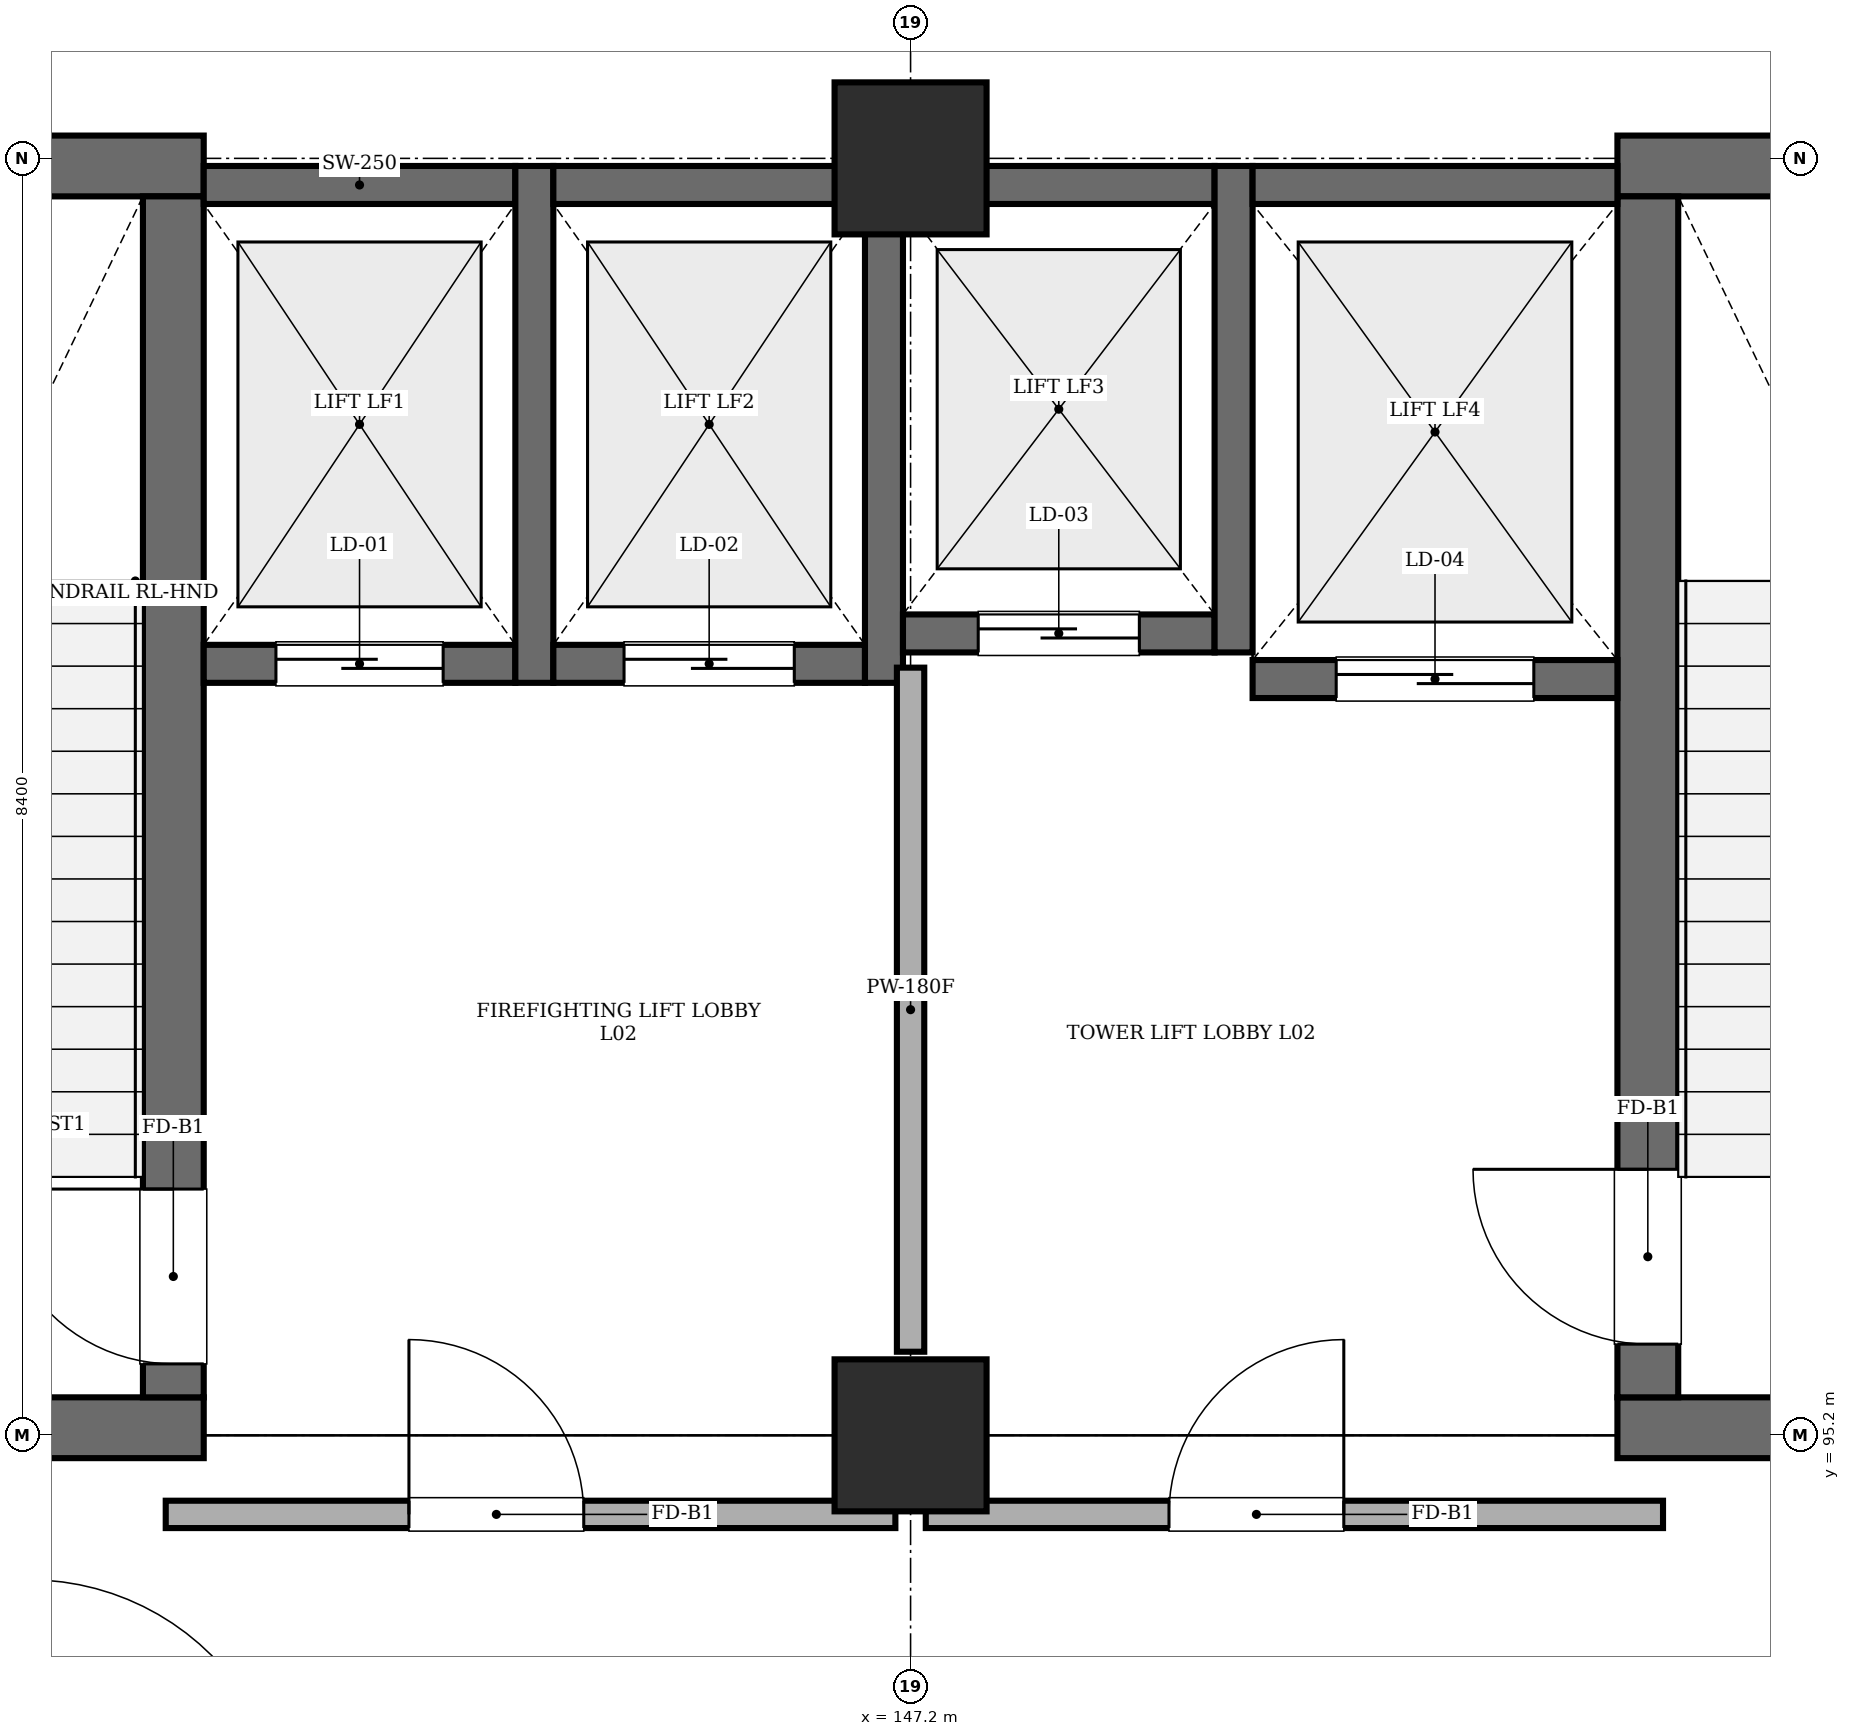
"""IFC4 building model, lengths in metres.
Left out: names, types, materials, properties, quantities, classifications, styles, units other than length and angle.
Written with IfcOpenShell. Run it as: python <this file> out.ifc"""

import sys

from ifc_helpers import new_model, si_unit, direction, frame, frame_2d, origin, origin_2d, place, context, subcontext, project, spatial, rectangle, extrude, element, fill, save


model = new_model("IFC4")
c1 = context("Model", 3, precision=1e-05, world=origin(), true_north=direction((0.0, 1.0)))
c2 = subcontext(c1, "Body", "Model", "MODEL_VIEW")
j1 = project(units=[si_unit("LENGTHUNIT", "METRE"), si_unit("PLANEANGLEUNIT", "RADIAN")], contexts=[c1])
p1 = place(None, origin())
s1 = spatial("IfcSite", under=j1, at=p1, CompositionType="ELEMENT")
p2 = place(p1, origin())
s2 = spatial("IfcBuilding", under=s1, at=p2, CompositionType="ELEMENT")
p3 = place(p2, frame((0.0, 0.0, 5.4)))
s3 = spatial("IfcBuildingStorey", under=s2, at=p3, CompositionType="ELEMENT", Elevation=5.4)
for number, where, z_axis, x_axis in (
    (1, (147.2, 95.2, 0.0), (0.0, 0.0, 1.0), (1.0, 0.0, 0.0)),
    (2, (147.2, 103.6, 0.0), (0.0, 0.0, 1.0), (1.0, 0.0, 0.0)),
):
    element("IfcColumn", number, at=place(p3, frame(where, z_axis=z_axis, x_axis=x_axis)), inside=s3, PredefinedType="COLUMN", context=c2, shape_type="SweptSolid", body=[
        extrude(rectangle(XDim=1.0, YDim=1.0, at=origin_2d()), origin(), (0.0, 0.0, 1.0), 4.58),
    ])
for number, where, z_axis, x_axis in (
    (3, (138.65, 95.25, 0.0), (0.0, 0.0, 1.0), (1.0, 0.0, 0.0)),
    (4, (138.65, 103.55, 0.0), (0.0, 0.0, 1.0), (1.0, 0.0, 0.0)),
):
    element("IfcWall", number, at=place(p3, frame(where, z_axis=z_axis, x_axis=x_axis)), inside=s3, PredefinedType="SHEAR", context=c2, shape_type="SweptSolid", body=[
        extrude(rectangle(XDim=3.9, YDim=0.4, at=frame_2d((1.95, 0.0))), origin(), (0.0, 0.0, 1.0), 4.58),
    ])
p4 = place(p3, frame((142.35, 95.45, 0.0), z_axis=(0.0, 0.0, 1.0), x_axis=(0.0, 1.0, 0.0)))
e5 = element("IfcWall", 5, at=p4, inside=s3, PredefinedType="SHEAR", context=c2, shape_type="SweptSolid", body=[
    extrude(rectangle(XDim=7.9, YDim=0.4, at=frame_2d((3.95, 0.0))), origin(), (0.0, 0.0, 1.0), 4.58),
])
p5 = place(p4, frame((0.22, 0.0, 0.0)))
e6 = element("IfcOpeningElement", 6, at=p5, cuts=e5, PredefinedType="OPENING", context=c2, shape_type="SweptSolid", body=[
    extrude(rectangle(XDim=1.15, YDim=2.15, at=frame_2d((0.575, 1.075))), frame((0.0, 0.21, 0.0), z_axis=(0.0, -1.0, 0.0), x_axis=(1.0, 0.0, 0.0)), (0.0, 0.0, 1.0), 0.42),
])
for number, where, z_axis, x_axis in (
    (7, (151.85, 95.25, 0.0), (0.0, 0.0, 1.0), (1.0, 0.0, 0.0)),
    (8, (151.85, 103.55, 0.0), (0.0, 0.0, 1.0), (1.0, 0.0, 0.0)),
):
    element("IfcWall", number, at=place(p3, frame(where, z_axis=z_axis, x_axis=x_axis)), inside=s3, PredefinedType="SHEAR", context=c2, shape_type="SweptSolid", body=[
        extrude(rectangle(XDim=3.9, YDim=0.4, at=frame_2d((1.95, 0.0))), origin(), (0.0, 0.0, 1.0), 4.58),
    ])
p6 = place(p3, frame((152.05, 95.45, 0.0), z_axis=(0.0, 0.0, 1.0), x_axis=(0.0, 1.0, 0.0)))
e9 = element("IfcWall", 9, at=p6, inside=s3, PredefinedType="SHEAR", context=c2, shape_type="SweptSolid", body=[
    extrude(rectangle(XDim=7.9, YDim=0.4, at=frame_2d((3.95, 0.0))), origin(), (0.0, 0.0, 1.0), 4.58),
])
p7 = place(p6, frame((0.35, 0.0, 0.0)))
e10 = element("IfcOpeningElement", 10, at=p7, cuts=e9, PredefinedType="OPENING", context=c2, shape_type="SweptSolid", body=[
    extrude(rectangle(XDim=1.15, YDim=2.15, at=frame_2d((0.575, 1.075))), frame((0.0, 0.21, 0.0), z_axis=(0.0, -1.0, 0.0), x_axis=(1.0, 0.0, 0.0)), (0.0, 0.0, 1.0), 0.42),
])
p8 = place(p3, frame((142.55, 100.275, 0.0), z_axis=(0.0, 0.0, 1.0), x_axis=(1.0, 0.0, 0.0)))
e11 = element("IfcWall", 11, at=p8, inside=s3, PredefinedType="SHEAR", context=c2, shape_type="SweptSolid", body=[
    extrude(rectangle(XDim=2.05, YDim=0.25, at=frame_2d((1.025, 0.0))), origin(), (0.0, 0.0, 1.0), 4.58),
])
p9 = place(p8, frame((0.475, 0.0, 0.0)))
e12 = element("IfcOpeningElement", 12, at=p9, cuts=e11, PredefinedType="OPENING", context=c2, shape_type="SweptSolid", body=[
    extrude(rectangle(XDim=1.1, YDim=2.15, at=frame_2d((0.55, 1.075))), frame((0.0, 0.135, 0.0), z_axis=(0.0, -1.0, 0.0), x_axis=(1.0, 0.0, 0.0)), (0.0, 0.0, 1.0), 0.27),
])
p10 = place(p3, frame((142.55, 103.425, 0.0), z_axis=(0.0, 0.0, 1.0), x_axis=(1.0, 0.0, 0.0)))
e13 = element("IfcWall", 13, at=p10, inside=s3, PredefinedType="SHEAR", context=c2, shape_type="SweptSolid", body=[
    extrude(rectangle(XDim=2.05, YDim=0.25, at=frame_2d((1.025, 0.0))), origin(), (0.0, 0.0, 1.0), 4.58),
])
p11 = place(p3, frame((144.725, 100.15, 0.0), z_axis=(0.0, 0.0, 1.0), x_axis=(0.0, 1.0, 0.0)))
e14 = element("IfcWall", 14, at=p11, inside=s3, PredefinedType="SHEAR", context=c2, shape_type="SweptSolid", body=[
    extrude(rectangle(XDim=3.4, YDim=0.25, at=frame_2d((1.7, 0.0))), origin(), (0.0, 0.0, 1.0), 4.58),
])
p12 = place(p3, frame((144.85, 100.275, 0.0), z_axis=(0.0, 0.0, 1.0), x_axis=(1.0, 0.0, 0.0)))
e15 = element("IfcWall", 15, at=p12, inside=s3, PredefinedType="SHEAR", context=c2, shape_type="SweptSolid", body=[
    extrude(rectangle(XDim=2.05, YDim=0.25, at=frame_2d((1.025, 0.0))), origin(), (0.0, 0.0, 1.0), 4.58),
])
p13 = place(p12, frame((0.465, 0.0, 0.0)))
e16 = element("IfcOpeningElement", 16, at=p13, cuts=e15, PredefinedType="OPENING", context=c2, shape_type="SweptSolid", body=[
    extrude(rectangle(XDim=1.12, YDim=2.15, at=frame_2d((0.56, 1.075))), frame((0.0, 0.135, 0.0), z_axis=(0.0, -1.0, 0.0), x_axis=(1.0, 0.0, 0.0)), (0.0, 0.0, 1.0), 0.27),
])
p14 = place(p3, frame((144.85, 103.425, 0.0), z_axis=(0.0, 0.0, 1.0), x_axis=(1.0, 0.0, 0.0)))
e17 = element("IfcWall", 17, at=p14, inside=s3, PredefinedType="SHEAR", context=c2, shape_type="SweptSolid", body=[
    extrude(rectangle(XDim=2.05, YDim=0.25, at=frame_2d((1.025, 0.0))), origin(), (0.0, 0.0, 1.0), 4.58),
])
p15 = place(p3, frame((147.025, 100.15, 0.0), z_axis=(0.0, 0.0, 1.0), x_axis=(0.0, 1.0, 0.0)))
e18 = element("IfcWall", 18, at=p15, inside=s3, PredefinedType="SHEAR", context=c2, shape_type="SweptSolid", body=[
    extrude(rectangle(XDim=3.4, YDim=0.25, at=frame_2d((1.7, 0.0))), origin(), (0.0, 0.0, 1.0), 4.58),
])
p16 = place(p3, frame((147.15, 100.475, 0.0), z_axis=(0.0, 0.0, 1.0), x_axis=(1.0, 0.0, 0.0)))
e19 = element("IfcWall", 19, at=p16, inside=s3, PredefinedType="SHEAR", context=c2, shape_type="SweptSolid", body=[
    extrude(rectangle(XDim=2.05, YDim=0.25, at=frame_2d((1.025, 0.0))), origin(), (0.0, 0.0, 1.0), 4.58),
])
p17 = place(p16, frame((0.495, 0.0, 0.0)))
e20 = element("IfcOpeningElement", 20, at=p17, cuts=e19, PredefinedType="OPENING", context=c2, shape_type="SweptSolid", body=[
    extrude(rectangle(XDim=1.06, YDim=2.15, at=frame_2d((0.53, 1.075))), frame((0.0, 0.135, 0.0), z_axis=(0.0, -1.0, 0.0), x_axis=(1.0, 0.0, 0.0)), (0.0, 0.0, 1.0), 0.27),
])
p18 = place(p3, frame((147.15, 103.425, 0.0), z_axis=(0.0, 0.0, 1.0), x_axis=(1.0, 0.0, 0.0)))
e21 = element("IfcWall", 21, at=p18, inside=s3, PredefinedType="SHEAR", context=c2, shape_type="SweptSolid", body=[
    extrude(rectangle(XDim=2.05, YDim=0.25, at=frame_2d((1.025, 0.0))), origin(), (0.0, 0.0, 1.0), 4.58),
])
p19 = place(p3, frame((149.325, 100.35, 0.0), z_axis=(0.0, 0.0, 1.0), x_axis=(0.0, 1.0, 0.0)))
e22 = element("IfcWall", 22, at=p19, inside=s3, PredefinedType="SHEAR", context=c2, shape_type="SweptSolid", body=[
    extrude(rectangle(XDim=3.2, YDim=0.25, at=frame_2d((1.6, 0.0))), origin(), (0.0, 0.0, 1.0), 4.58),
])
p20 = place(p3, frame((149.45, 100.175, 0.0), z_axis=(0.0, 0.0, 1.0), x_axis=(1.0, 0.0, 0.0)))
e23 = element("IfcWall", 23, at=p20, inside=s3, PredefinedType="SHEAR", context=c2, shape_type="SweptSolid", body=[
    extrude(rectangle(XDim=2.4, YDim=0.25, at=frame_2d((1.2, 0.0))), origin(), (0.0, 0.0, 1.0), 4.58),
])
p21 = place(p20, frame((0.55, 0.0, 0.0)))
e24 = element("IfcOpeningElement", 24, at=p21, cuts=e23, PredefinedType="OPENING", context=c2, shape_type="SweptSolid", body=[
    extrude(rectangle(XDim=1.3, YDim=2.25, at=frame_2d((0.65, 1.125))), frame((0.0, 0.135, 0.0), z_axis=(0.0, -1.0, 0.0), x_axis=(1.0, 0.0, 0.0)), (0.0, 0.0, 1.0), 0.27),
])
p22 = place(p3, frame((149.45, 103.425, 0.0), z_axis=(0.0, 0.0, 1.0), x_axis=(1.0, 0.0, 0.0)))
e25 = element("IfcWall", 25, at=p22, inside=s3, PredefinedType="SHEAR", context=c2, shape_type="SweptSolid", body=[
    extrude(rectangle(XDim=2.4, YDim=0.25, at=frame_2d((1.2, 0.0))), origin(), (0.0, 0.0, 1.0), 4.58),
])
p23 = place(p3, frame((142.3, 94.68, 0.0), z_axis=(0.0, 0.0, 1.0), x_axis=(1.0, 0.0, 0.0)))
e26 = element("IfcWall", 26, at=p23, inside=s3, PredefinedType="STANDARD", context=c2, shape_type="SweptSolid", body=[
    extrude(rectangle(XDim=4.8, YDim=0.18, at=frame_2d((2.4, 0.0))), origin(), (0.0, 0.0, 1.0), 4.58),
])
p24 = place(p23, frame((1.6, 0.0, 0.0)))
e27 = element("IfcOpeningElement", 27, at=p24, cuts=e26, PredefinedType="OPENING", context=c2, shape_type="SweptSolid", body=[
    extrude(rectangle(XDim=1.15, YDim=2.15, at=frame_2d((0.575, 1.075))), frame((0.0, 0.1, 0.0), z_axis=(0.0, -1.0, 0.0), x_axis=(1.0, 0.0, 0.0)), (0.0, 0.0, 1.0), 0.2),
])
p25 = place(p3, frame((147.3, 94.68, 0.0), z_axis=(0.0, 0.0, 1.0), x_axis=(1.0, 0.0, 0.0)))
e28 = element("IfcWall", 28, at=p25, inside=s3, PredefinedType="STANDARD", context=c2, shape_type="SweptSolid", body=[
    extrude(rectangle(XDim=4.85, YDim=0.18, at=frame_2d((2.425, 0.0))), origin(), (0.0, 0.0, 1.0), 4.58),
])
p26 = place(p25, frame((1.6, 0.0, 0.0)))
e29 = element("IfcOpeningElement", 29, at=p26, cuts=e28, PredefinedType="OPENING", context=c2, shape_type="SweptSolid", body=[
    extrude(rectangle(XDim=1.15, YDim=2.15, at=frame_2d((0.575, 1.075))), frame((0.0, 0.1, 0.0), z_axis=(0.0, -1.0, 0.0), x_axis=(1.0, 0.0, 0.0)), (0.0, 0.0, 1.0), 0.2),
])
p27 = place(p3, frame((147.2, 95.75, 0.0), z_axis=(0.0, 0.0, 1.0), x_axis=(0.0, 1.0, 0.0)))
e30 = element("IfcWall", 30, at=p27, inside=s3, PredefinedType="STANDARD", context=c2, shape_type="SweptSolid", body=[
    extrude(rectangle(XDim=4.5, YDim=0.18, at=frame_2d((2.25, 0.0))), origin(), (0.0, 0.0, 1.0), 3.83),
])
p28 = place(p24, origin())
e31 = element("IfcDoor", 31, at=p28, inside=s3, OperationType="SINGLE_SWING_LEFT", PredefinedType="DOOR", context=c2, shape_type="SweptSolid", body=[
    extrude(rectangle(XDim=1.15, YDim=2.15, at=frame_2d((0.575, 1.075))), frame((0.0, 0.025, 0.0), z_axis=(0.0, -1.0, 0.0), x_axis=(1.0, 0.0, 0.0)), (0.0, 0.0, 1.0), 0.05),
])
fill(e27, e31)
p29 = place(p26, origin())
e32 = element("IfcDoor", 32, at=p29, inside=s3, OperationType="SINGLE_SWING_RIGHT", PredefinedType="DOOR", context=c2, shape_type="SweptSolid", body=[
    extrude(rectangle(XDim=1.15, YDim=2.15, at=frame_2d((0.575, 1.075))), frame((0.0, 0.025, 0.0), z_axis=(0.0, -1.0, 0.0), x_axis=(1.0, 0.0, 0.0)), (0.0, 0.0, 1.0), 0.05),
])
fill(e29, e32)
p30 = place(p5, origin())
e33 = element("IfcDoor", 33, at=p30, inside=s3, OperationType="SINGLE_SWING_RIGHT", PredefinedType="DOOR", context=c2, shape_type="SweptSolid", body=[
    extrude(rectangle(XDim=1.15, YDim=2.15, at=frame_2d((0.575, 1.075))), frame((0.0, 0.025, 0.0), z_axis=(0.0, -1.0, 0.0), x_axis=(1.0, 0.0, 0.0)), (0.0, 0.0, 1.0), 0.05),
])
fill(e6, e33)
p31 = place(p7, origin())
e34 = element("IfcDoor", 34, at=p31, inside=s3, OperationType="SINGLE_SWING_RIGHT", PredefinedType="DOOR", context=c2, shape_type="SweptSolid", body=[
    extrude(rectangle(XDim=1.15, YDim=2.15, at=frame_2d((0.575, 1.075))), frame((0.0, 0.025, 0.0), z_axis=(0.0, -1.0, 0.0), x_axis=(1.0, 0.0, 0.0)), (0.0, 0.0, 1.0), 0.05),
])
fill(e10, e34)
p32 = place(p9, origin())
e35 = element("IfcDoor", 35, at=p32, inside=s3, OperationType="SLIDING_TO_LEFT", PredefinedType="DOOR", context=c2, shape_type="SweptSolid", body=[
    extrude(rectangle(XDim=1.1, YDim=2.15, at=frame_2d((0.55, 1.075))), frame((0.0, 0.025, 0.0), z_axis=(0.0, -1.0, 0.0), x_axis=(1.0, 0.0, 0.0)), (0.0, 0.0, 1.0), 0.05),
])
fill(e12, e35)
p33 = place(p13, origin())
e36 = element("IfcDoor", 36, at=p33, inside=s3, OperationType="SLIDING_TO_LEFT", PredefinedType="DOOR", context=c2, shape_type="SweptSolid", body=[
    extrude(rectangle(XDim=1.12, YDim=2.15, at=frame_2d((0.56, 1.075))), frame((0.0, 0.025, 0.0), z_axis=(0.0, -1.0, 0.0), x_axis=(1.0, 0.0, 0.0)), (0.0, 0.0, 1.0), 0.05),
])
fill(e16, e36)
p34 = place(p17, origin())
e37 = element("IfcDoor", 37, at=p34, inside=s3, OperationType="SLIDING_TO_LEFT", PredefinedType="DOOR", context=c2, shape_type="SweptSolid", body=[
    extrude(rectangle(XDim=1.06, YDim=2.15, at=frame_2d((0.53, 1.075))), frame((0.0, 0.025, 0.0), z_axis=(0.0, -1.0, 0.0), x_axis=(1.0, 0.0, 0.0)), (0.0, 0.0, 1.0), 0.05),
])
fill(e20, e37)
p35 = place(p21, origin())
e38 = element("IfcDoor", 38, at=p35, inside=s3, OperationType="SLIDING_TO_LEFT", PredefinedType="DOOR", context=c2, shape_type="SweptSolid", body=[
    extrude(rectangle(XDim=1.3, YDim=2.25, at=frame_2d((0.65, 1.125))), frame((0.0, 0.025, 0.0), z_axis=(0.0, -1.0, 0.0), x_axis=(1.0, 0.0, 0.0)), (0.0, 0.0, 1.0), 0.05),
])
fill(e24, e38)
save(model, sys.argv[1])
